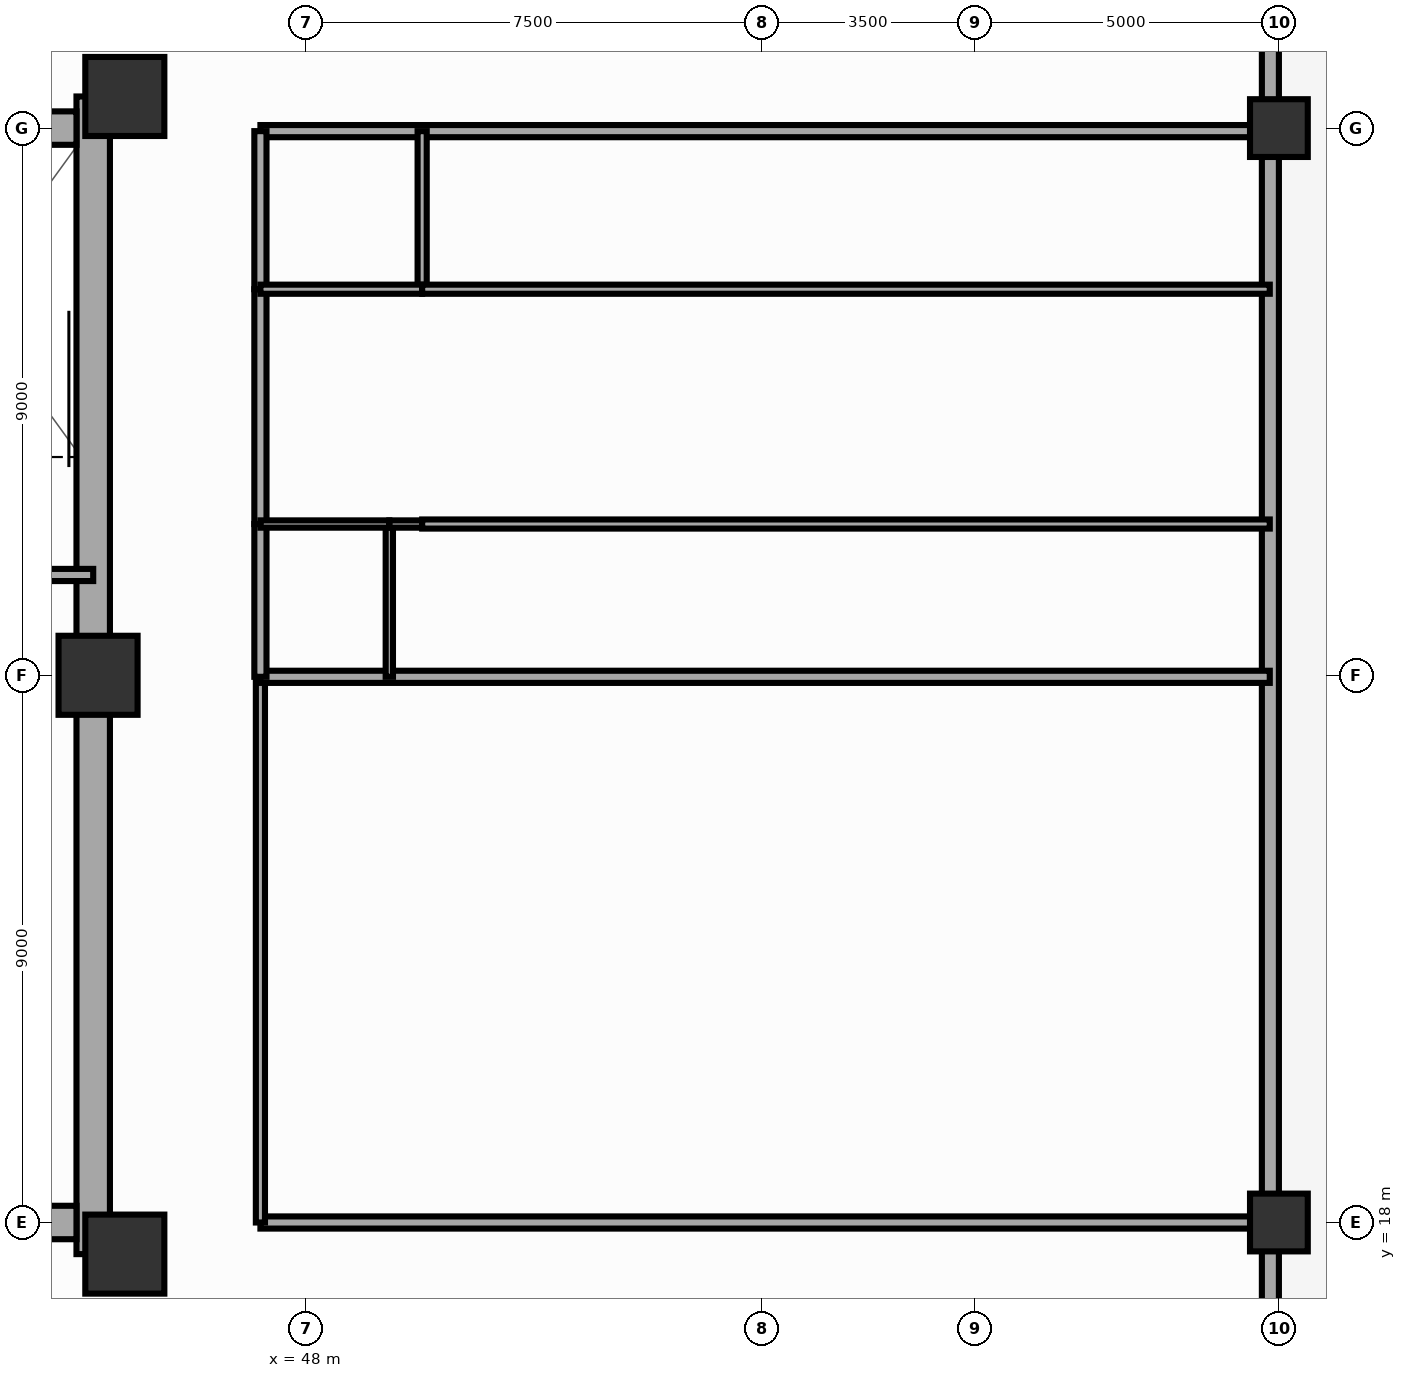
"""IFC4 building model, lengths in metres.
Left out: names, types, materials, properties, quantities, classifications, styles, units other than length and angle.
Written with IfcOpenShell. Run it as: python <this file> out.ifc"""

import sys

from ifc_helpers import new_model, si_unit, direction, frame, frame_2d, origin, origin_2d, place, context, subcontext, project, spatial, rectangle, extrude, source, transform, mapped, element, fill, save


model = new_model("IFC4")
c1 = context("Model", 3, precision=1e-05, world=origin(), true_north=direction((0.0, 1.0)))
c2 = subcontext(c1, "Body", "Model", "MODEL_VIEW")
j1 = project(units=[si_unit("LENGTHUNIT", "METRE"), si_unit("PLANEANGLEUNIT", "RADIAN")], contexts=[c1])
p1 = place(None, origin())
s1 = spatial("IfcSite", under=j1, at=p1, CompositionType="ELEMENT")
p2 = place(p1, origin())
s2 = spatial("IfcBuilding", under=s1, at=p2, CompositionType="ELEMENT")
p3 = place(p2, frame((0.0, 0.0, 74.35)))
s3 = spatial("IfcBuildingStorey", under=s2, at=p3, CompositionType="ELEMENT", Elevation=74.35)
p4 = place(p3, frame((44.5, 17.48, 0.0), z_axis=(0.0, 0.0, 1.0), x_axis=(0.0, 1.0, 0.0)))
e1 = element("IfcWall", 1, at=p4, inside=s3, PredefinedType="SHEAR", context=c2, shape_type="SweptSolid", body=[
    extrude(rectangle(XDim=19.04, YDim=0.55, at=frame_2d((9.52, 0.0))), origin(), (0.0, 0.0, 1.0), 3.5),
])
p5 = place(p4, frame((12.67, 0.0, 0.0), z_axis=(0.0, 0.0, 1.0), x_axis=(-1.0, 0.0, 0.0)))
e2 = element("IfcOpeningElement", 2, at=p5, cuts=e1, PredefinedType="OPENING", context=c2, shape_type="SweptSolid", body=[
    extrude(rectangle(XDim=1.1, YDim=2.15, at=frame_2d((0.55, 1.075))), frame((0.0, 0.287, 0.0), z_axis=(0.0, -1.0, 0.0), x_axis=(1.0, 0.0, 0.0)), (0.0, 0.0, 1.0), 0.574),
])
p6 = place(p3, frame((31.775, 18.0, 0.0), z_axis=(0.0, 0.0, 1.0), x_axis=(1.0, 0.0, 0.0)))
e3 = element("IfcWall", 3, at=p6, inside=s3, PredefinedType="SHEAR", context=c2, shape_type="SweptSolid", body=[
    extrude(rectangle(XDim=12.45, YDim=0.55, at=frame_2d((6.225, 0.0))), origin(), (0.0, 0.0, 1.0), 3.5),
])
p7 = place(p3, frame((31.775, 36.0, 0.0), z_axis=(0.0, 0.0, 1.0), x_axis=(1.0, 0.0, 0.0)))
e4 = element("IfcWall", 4, at=p7, inside=s3, PredefinedType="SHEAR", context=c2, shape_type="SweptSolid", body=[
    extrude(rectangle(XDim=12.45, YDim=0.55, at=frame_2d((6.225, 0.0))), origin(), (0.0, 0.0, 1.0), 3.5),
])
p8 = place(p7, frame((5.175, 0.0, 0.0), z_axis=(0.0, 0.0, 1.0), x_axis=(-1.0, 0.0, 0.0)))
e5 = element("IfcOpeningElement", 5, at=p8, cuts=e4, PredefinedType="OPENING", context=c2, shape_type="SweptSolid", body=[
    extrude(rectangle(XDim=1.4, YDim=2.15, at=frame_2d((0.7, 1.075))), frame((0.0, 0.287, 0.0), z_axis=(0.0, -1.0, 0.0), x_axis=(1.0, 0.0, 0.0)), (0.0, 0.0, 1.0), 0.574),
])
m1 = source(origin(), c2, "Body", "SweptSolid", [
    extrude(rectangle(XDim=1.3, YDim=1.3, at=origin_2d()), origin(), (0.0, 0.0, 1.0), 3.5),
])
for number, where, z_axis, x_axis in (
    (6, (45.02, 17.48, 0.0), (0.0, 0.0, 1.0), (1.0, 0.0, 0.0)),
    (7, (45.02, 36.52, 0.0), (0.0, 0.0, 1.0), (1.0, 0.0, 0.0)),
    (8, (44.58, 27.0, 0.0), (0.0, 0.0, 1.0), (1.0, 0.0, 0.0)),
):
    element("IfcColumn", number, at=place(p3, frame(where, z_axis=z_axis, x_axis=x_axis)), inside=s3, PredefinedType="COLUMN", context=c2, shape_type="MappedRepresentation", body=[
        mapped(m1, transform((0.0, 0.0, 0.0), scale=1.0)),
    ])
m2 = source(origin(), c2, "Body", "SweptSolid", [
    extrude(rectangle(XDim=0.95, YDim=0.95, at=origin_2d()), origin(), (0.0, 0.0, 1.0), 3.5),
])
for number, where, z_axis, x_axis in (
    (9, (64.0, 18.0, 0.0), (0.0, 0.0, 1.0), (1.0, 0.0, 0.0)),
    (10, (64.0, 36.0, 0.0), (0.0, 0.0, 1.0), (1.0, 0.0, 0.0)),
):
    element("IfcColumn", number, at=place(p3, frame(where, z_axis=z_axis, x_axis=x_axis)), inside=s3, PredefinedType="COLUMN", context=c2, shape_type="MappedRepresentation", body=[
        mapped(m2, transform((0.0, 0.0, 0.0), scale=1.0)),
    ])
p9 = place(p3, frame((63.86, 7.2, 0.0), z_axis=(0.0, 0.0, 1.0), x_axis=(0.0, 1.0, 0.0)))
e11 = element("IfcWall", 11, at=p9, inside=s3, PredefinedType="SOLIDWALL", context=c2, shape_type="SweptSolid", body=[
    extrude(rectangle(XDim=39.6, YDim=0.28, at=frame_2d((19.8, 0.0))), origin(), (0.0, 0.0, 1.0), 2.78),
])
p10 = place(p9, frame((6.2, 0.0, 0.0), z_axis=(0.0, 0.0, 1.0), x_axis=(-1.0, 0.0, 0.0)))
e12 = element("IfcOpeningElement", 12, at=p10, cuts=e11, PredefinedType="OPENING", context=c2, shape_type="SweptSolid", body=[
    extrude(rectangle(XDim=1.6, YDim=2.15, at=frame_2d((0.8, 1.075))), frame((0.0, 0.152, 0.0), z_axis=(0.0, -1.0, 0.0), x_axis=(1.0, 0.0, 0.0)), (0.0, 0.0, 1.0), 0.304),
])
p11 = place(p9, frame((14.545, 0.0, 0.85)))
e13 = element("IfcOpeningElement", 13, at=p11, cuts=e11, PredefinedType="OPENING", context=c2, shape_type="SweptSolid", body=[
    extrude(rectangle(XDim=1.8, YDim=1.65, at=frame_2d((0.9, 0.825))), frame((0.0, 0.152, 0.0), z_axis=(0.0, -1.0, 0.0), x_axis=(1.0, 0.0, 0.0)), (0.0, 0.0, 1.0), 0.304),
])
p12 = place(p9, frame((20.281, 0.0, 0.85)))
e14 = element("IfcOpeningElement", 14, at=p12, cuts=e11, PredefinedType="OPENING", context=c2, shape_type="SweptSolid", body=[
    extrude(rectangle(XDim=1.5, YDim=1.65, at=frame_2d((0.75, 0.825))), frame((0.0, 0.152, 0.0), z_axis=(0.0, -1.0, 0.0), x_axis=(1.0, 0.0, 0.0)), (0.0, 0.0, 1.0), 0.304),
])
p13 = place(p9, frame((23.319, 0.0, 0.85)))
e15 = element("IfcOpeningElement", 15, at=p13, cuts=e11, PredefinedType="OPENING", context=c2, shape_type="SweptSolid", body=[
    extrude(rectangle(XDim=1.8, YDim=1.65, at=frame_2d((0.9, 0.825))), frame((0.0, 0.152, 0.0), z_axis=(0.0, -1.0, 0.0), x_axis=(1.0, 0.0, 0.0)), (0.0, 0.0, 1.0), 0.304),
])
p14 = place(p9, frame((26.567, 0.0, 0.85)))
e16 = element("IfcOpeningElement", 16, at=p14, cuts=e11, PredefinedType="OPENING", context=c2, shape_type="SweptSolid", body=[
    extrude(rectangle(XDim=1.5, YDim=1.65, at=frame_2d((0.75, 0.825))), frame((0.0, 0.152, 0.0), z_axis=(0.0, -1.0, 0.0), x_axis=(1.0, 0.0, 0.0)), (0.0, 0.0, 1.0), 0.304),
])
p15 = place(p9, frame((33.3, 0.0, 0.85)))
e17 = element("IfcOpeningElement", 17, at=p15, cuts=e11, PredefinedType="OPENING", context=c2, shape_type="SweptSolid", body=[
    extrude(rectangle(XDim=1.8, YDim=1.65, at=frame_2d((0.9, 0.825))), frame((0.0, 0.152, 0.0), z_axis=(0.0, -1.0, 0.0), x_axis=(1.0, 0.0, 0.0)), (0.0, 0.0, 1.0), 0.304),
])
p16 = place(p3, frame((40.57, 28.65, 0.0), z_axis=(0.0, 0.0, 1.0), x_axis=(1.0, 0.0, 0.0)))
e18 = element("IfcWall", 18, at=p16, inside=s3, PredefinedType="SOLIDWALL", context=c2, shape_type="SweptSolid", body=[
    extrude(rectangle(XDim=3.93, YDim=0.2, at=frame_2d((1.965, 0.0))), origin(), (0.0, 0.0, 1.0), 3.29),
])
for number, where, z_axis, x_axis in (
    (19, (47.25, 18.0, 0.0), (0.0, 0.0, 1.0), (1.0, 0.0, 0.0)),
    (20, (47.25, 35.95, 0.0), (0.0, 0.0, 1.0), (1.0, 0.0, 0.0)),
):
    element("IfcWall", number, at=place(p3, frame(where, z_axis=z_axis, x_axis=x_axis)), inside=s3, PredefinedType="PARTITIONING", context=c2, shape_type="SweptSolid", body=[
        extrude(rectangle(XDim=16.6, YDim=0.2, at=frame_2d((8.3, 0.0))), origin(), (0.0, 0.0, 1.0), 2.84),
    ])
p17 = place(p3, frame((47.25, 18.0, 0.0), z_axis=(0.0, 0.0, 1.0), x_axis=(0.0, 1.0, 0.0)))
e21 = element("IfcWall", 21, at=p17, inside=s3, PredefinedType="PARTITIONING", context=c2, shape_type="SweptSolid", body=[
    extrude(rectangle(XDim=8.975, YDim=0.15, at=frame_2d((4.488, 0.0))), origin(), (0.0, 0.0, 1.0), 3.29),
])
p18 = place(p17, frame((3.938, 0.0, 0.0)))
e22 = element("IfcOpeningElement", 22, at=p18, cuts=e21, PredefinedType="OPENING", context=c2, shape_type="SweptSolid", body=[
    extrude(rectangle(XDim=1.1, YDim=2.15, at=frame_2d((0.55, 1.075))), frame((0.0, 0.087, 0.0), z_axis=(0.0, -1.0, 0.0), x_axis=(1.0, 0.0, 0.0)), (0.0, 0.0, 1.0), 0.174),
])
p19 = place(p3, frame((47.25, 26.975, 0.0), z_axis=(0.0, 0.0, 1.0), x_axis=(1.0, 0.0, 0.0)))
e23 = element("IfcWall", 23, at=p19, inside=s3, PredefinedType="PARTITIONING", context=c2, shape_type="SweptSolid", body=[
    extrude(rectangle(XDim=16.6, YDim=0.2, at=frame_2d((8.3, 0.0))), origin(), (0.0, 0.0, 1.0), 3.29),
])
p20 = place(p3, frame((47.25, 26.975, 0.0), z_axis=(0.0, 0.0, 1.0), x_axis=(0.0, 1.0, 0.0)))
e24 = element("IfcWall", 24, at=p20, inside=s3, PredefinedType="PARTITIONING", context=c2, shape_type="SweptSolid", body=[
    extrude(rectangle(XDim=2.513, YDim=0.2, at=frame_2d((1.256, 0.0))), origin(), (0.0, 0.0, 1.0), 3.29),
])
p21 = place(p3, frame((47.25, 29.488, 0.0), z_axis=(0.0, 0.0, 1.0), x_axis=(0.0, 1.0, 0.0)))
e25 = element("IfcWall", 25, at=p21, inside=s3, PredefinedType="PARTITIONING", context=c2, shape_type="SweptSolid", body=[
    extrude(rectangle(XDim=3.862, YDim=0.2, at=frame_2d((1.931, 0.0))), origin(), (0.0, 0.0, 1.0), 3.29),
])
p22 = place(p21, frame((1.431, 0.0, 0.0)))
e26 = element("IfcOpeningElement", 26, at=p22, cuts=e25, PredefinedType="OPENING", context=c2, shape_type="SweptSolid", body=[
    extrude(rectangle(XDim=1.0, YDim=2.15, at=frame_2d((0.5, 1.075))), frame((0.0, 0.112, 0.0), z_axis=(0.0, -1.0, 0.0), x_axis=(1.0, 0.0, 0.0)), (0.0, 0.0, 1.0), 0.224),
])
p23 = place(p3, frame((47.25, 33.35, 0.0), z_axis=(0.0, 0.0, 1.0), x_axis=(0.0, 1.0, 0.0)))
e27 = element("IfcWall", 27, at=p23, inside=s3, PredefinedType="PARTITIONING", context=c2, shape_type="SweptSolid", body=[
    extrude(rectangle(XDim=2.6, YDim=0.2, at=frame_2d((1.3, 0.0))), origin(), (0.0, 0.0, 1.0), 3.29),
])
p24 = place(p3, frame((49.37, 26.975, 0.0), z_axis=(0.0, 0.0, 1.0), x_axis=(0.0, 1.0, 0.0)))
e28 = element("IfcWall", 28, at=p24, inside=s3, PredefinedType="PARTITIONING", context=c2, shape_type="SweptSolid", body=[
    extrude(rectangle(XDim=2.513, YDim=0.12, at=frame_2d((1.256, 0.0))), origin(), (0.0, 0.0, 1.0), 3.29),
])
p25 = place(p3, frame((49.91, 33.35, 0.0), z_axis=(0.0, 0.0, 1.0), x_axis=(0.0, 1.0, 0.0)))
e29 = element("IfcWall", 29, at=p25, inside=s3, PredefinedType="PARTITIONING", context=c2, shape_type="SweptSolid", body=[
    extrude(rectangle(XDim=2.6, YDim=0.15, at=frame_2d((1.3, 0.0))), origin(), (0.0, 0.0, 1.0), 3.29),
])
p26 = place(p3, frame((47.25, 29.488, 0.0), z_axis=(0.0, 0.0, 1.0), x_axis=(1.0, 0.0, 0.0)))
e30 = element("IfcWall", 30, at=p26, inside=s3, PredefinedType="PARTITIONING", context=c2, shape_type="SweptSolid", body=[
    extrude(rectangle(XDim=2.12, YDim=0.12, at=frame_2d((1.06, 0.0))), origin(), (0.0, 0.0, 1.0), 3.29),
])
p27 = place(p26, frame((0.635, 0.0, 0.0)))
e31 = element("IfcOpeningElement", 31, at=p27, cuts=e30, PredefinedType="OPENING", context=c2, shape_type="SweptSolid", body=[
    extrude(rectangle(XDim=0.85, YDim=2.05, at=frame_2d((0.425, 1.025))), frame((0.0, 0.072, 0.0), z_axis=(0.0, -1.0, 0.0), x_axis=(1.0, 0.0, 0.0)), (0.0, 0.0, 1.0), 0.144),
])
p28 = place(p3, frame((49.37, 29.488, 0.0), z_axis=(0.0, 0.0, 1.0), x_axis=(1.0, 0.0, 0.0)))
e32 = element("IfcWall", 32, at=p28, inside=s3, PredefinedType="PARTITIONING", context=c2, shape_type="SweptSolid", body=[
    extrude(rectangle(XDim=0.54, YDim=0.12, at=frame_2d((0.27, 0.0))), origin(), (0.0, 0.0, 1.0), 3.29),
])
p29 = place(p3, frame((49.91, 29.488, 0.0), z_axis=(0.0, 0.0, 1.0), x_axis=(1.0, 0.0, 0.0)))
e33 = element("IfcWall", 33, at=p29, inside=s3, PredefinedType="PARTITIONING", context=c2, shape_type="SweptSolid", body=[
    extrude(rectangle(XDim=13.94, YDim=0.15, at=frame_2d((6.97, 0.0))), origin(), (0.0, 0.0, 1.0), 3.29),
])
p30 = place(p29, frame((5.997, 0.0, 0.0)))
e34 = element("IfcOpeningElement", 34, at=p30, cuts=e33, PredefinedType="OPENING", context=c2, shape_type="SweptSolid", body=[
    extrude(rectangle(XDim=0.9, YDim=2.1, at=frame_2d((0.45, 1.05))), frame((0.0, 0.087, 0.0), z_axis=(0.0, -1.0, 0.0), x_axis=(1.0, 0.0, 0.0)), (0.0, 0.0, 1.0), 0.174),
])
p31 = place(p3, frame((47.25, 33.35, 0.0), z_axis=(0.0, 0.0, 1.0), x_axis=(1.0, 0.0, 0.0)))
e35 = element("IfcWall", 35, at=p31, inside=s3, PredefinedType="PARTITIONING", context=c2, shape_type="SweptSolid", body=[
    extrude(rectangle(XDim=2.66, YDim=0.15, at=frame_2d((1.33, 0.0))), origin(), (0.0, 0.0, 1.0), 3.29),
])
p32 = place(p31, frame((0.88, 0.0, 0.0)))
e36 = element("IfcOpeningElement", 36, at=p32, cuts=e35, PredefinedType="OPENING", context=c2, shape_type="SweptSolid", body=[
    extrude(rectangle(XDim=0.9, YDim=2.1, at=frame_2d((0.45, 1.05))), frame((0.0, 0.087, 0.0), z_axis=(0.0, -1.0, 0.0), x_axis=(1.0, 0.0, 0.0)), (0.0, 0.0, 1.0), 0.174),
])
p33 = place(p3, frame((49.91, 33.35, 0.0), z_axis=(0.0, 0.0, 1.0), x_axis=(1.0, 0.0, 0.0)))
e37 = element("IfcWall", 37, at=p33, inside=s3, PredefinedType="PARTITIONING", context=c2, shape_type="SweptSolid", body=[
    extrude(rectangle(XDim=13.94, YDim=0.15, at=frame_2d((6.97, 0.0))), origin(), (0.0, 0.0, 1.0), 3.29),
])
p34 = place(p33, frame((5.997, 0.0, 0.0)))
e38 = element("IfcOpeningElement", 38, at=p34, cuts=e37, PredefinedType="OPENING", context=c2, shape_type="SweptSolid", body=[
    extrude(rectangle(XDim=0.9, YDim=2.1, at=frame_2d((0.45, 1.05))), frame((0.0, 0.087, 0.0), z_axis=(0.0, -1.0, 0.0), x_axis=(1.0, 0.0, 0.0)), (0.0, 0.0, 1.0), 0.174),
])
m3 = source(origin(), c2, "Body", "SweptSolid", [
    extrude(rectangle(XDim=1.8, YDim=1.65, at=frame_2d((0.9, 0.825))), frame((0.0, 0.03, 0.0), z_axis=(0.0, -1.0, 0.0), x_axis=(1.0, 0.0, 0.0)), (0.0, 0.0, 1.0), 0.06),
])
p35 = place(p11, origin())
e39 = element("IfcWindow", 39, at=p35, inside=s3, PartitioningType="SINGLE_PANEL", PredefinedType="WINDOW", context=c2, shape_type="MappedRepresentation", body=[
    mapped(m3, transform((0.0, 0.0, 0.0), scale=1.0)),
])
fill(e13, e39)
m4 = source(origin(), c2, "Body", "SweptSolid", [
    extrude(rectangle(XDim=1.5, YDim=1.65, at=frame_2d((0.75, 0.825))), frame((0.0, 0.03, 0.0), z_axis=(0.0, -1.0, 0.0), x_axis=(1.0, 0.0, 0.0)), (0.0, 0.0, 1.0), 0.06),
])
p36 = place(p12, origin())
e40 = element("IfcWindow", 40, at=p36, inside=s3, PartitioningType="SINGLE_PANEL", PredefinedType="WINDOW", context=c2, shape_type="MappedRepresentation", body=[
    mapped(m4, transform((0.0, 0.0, 0.0), scale=1.0)),
])
fill(e14, e40)
p37 = place(p13, origin())
e41 = element("IfcWindow", 41, at=p37, inside=s3, PartitioningType="SINGLE_PANEL", PredefinedType="WINDOW", context=c2, shape_type="MappedRepresentation", body=[
    mapped(m3, transform((0.0, 0.0, 0.0), scale=1.0)),
])
fill(e15, e41)
p38 = place(p14, origin())
e42 = element("IfcWindow", 42, at=p38, inside=s3, PartitioningType="SINGLE_PANEL", PredefinedType="WINDOW", context=c2, shape_type="MappedRepresentation", body=[
    mapped(m4, transform((0.0, 0.0, 0.0), scale=1.0)),
])
fill(e16, e42)
m5 = source(origin(), c2, "Body", "SweptSolid", [
    extrude(rectangle(XDim=1.1, YDim=2.15, at=frame_2d((0.55, 1.075))), frame((0.0, 0.025, 0.0), z_axis=(0.0, -1.0, 0.0), x_axis=(1.0, 0.0, 0.0)), (0.0, 0.0, 1.0), 0.05),
])
p39 = place(p5, origin())
e43 = element("IfcDoor", 43, at=p39, inside=s3, OperationType="SINGLE_SWING_RIGHT", PredefinedType="DOOR", context=c2, shape_type="MappedRepresentation", body=[
    mapped(m5, transform((0.0, 0.0, 0.0), scale=1.0)),
])
fill(e2, e43)
p40 = place(p18, origin())
e44 = element("IfcDoor", 44, at=p40, inside=s3, OperationType="SINGLE_SWING_LEFT", PredefinedType="DOOR", context=c2, shape_type="MappedRepresentation", body=[
    mapped(m5, transform((0.0, 0.0, 0.0), scale=1.0)),
])
fill(e22, e44)
m6 = source(origin(), c2, "Body", "SweptSolid", [
    extrude(rectangle(XDim=1.0, YDim=2.15, at=frame_2d((0.5, 1.075))), frame((0.0, 0.025, 0.0), z_axis=(0.0, -1.0, 0.0), x_axis=(1.0, 0.0, 0.0)), (0.0, 0.0, 1.0), 0.05),
])
p41 = place(p22, origin())
e45 = element("IfcDoor", 45, at=p41, inside=s3, OperationType="SINGLE_SWING_RIGHT", PredefinedType="DOOR", context=c2, shape_type="MappedRepresentation", body=[
    mapped(m6, transform((0.0, 0.0, 0.0), scale=1.0)),
])
fill(e26, e45)
m7 = source(origin(), c2, "Body", "SweptSolid", [
    extrude(rectangle(XDim=0.85, YDim=2.05, at=frame_2d((0.425, 1.025))), frame((0.0, 0.025, 0.0), z_axis=(0.0, -1.0, 0.0), x_axis=(1.0, 0.0, 0.0)), (0.0, 0.0, 1.0), 0.05),
])
p42 = place(p27, origin())
e46 = element("IfcDoor", 46, at=p42, inside=s3, OperationType="SINGLE_SWING_LEFT", PredefinedType="DOOR", context=c2, shape_type="MappedRepresentation", body=[
    mapped(m7, transform((0.0, 0.0, 0.0), scale=1.0)),
])
fill(e31, e46)
m8 = source(origin(), c2, "Body", "SweptSolid", [
    extrude(rectangle(XDim=0.9, YDim=2.1, at=frame_2d((0.45, 1.05))), frame((0.0, 0.025, 0.0), z_axis=(0.0, -1.0, 0.0), x_axis=(1.0, 0.0, 0.0)), (0.0, 0.0, 1.0), 0.05),
])
p43 = place(p30, origin())
e47 = element("IfcDoor", 47, at=p43, inside=s3, OperationType="SINGLE_SWING_RIGHT", PredefinedType="DOOR", context=c2, shape_type="MappedRepresentation", body=[
    mapped(m8, transform((0.0, 0.0, 0.0), scale=1.0)),
])
fill(e34, e47)
p44 = place(p32, origin())
e48 = element("IfcDoor", 48, at=p44, inside=s3, OperationType="SINGLE_SWING_LEFT", PredefinedType="DOOR", context=c2, shape_type="MappedRepresentation", body=[
    mapped(m8, transform((0.0, 0.0, 0.0), scale=1.0)),
])
fill(e36, e48)
p45 = place(p34, origin())
e49 = element("IfcDoor", 49, at=p45, inside=s3, OperationType="SINGLE_SWING_RIGHT", PredefinedType="DOOR", context=c2, shape_type="MappedRepresentation", body=[
    mapped(m8, transform((0.0, 0.0, 0.0), scale=1.0)),
])
fill(e38, e49)
save(model, sys.argv[1])
